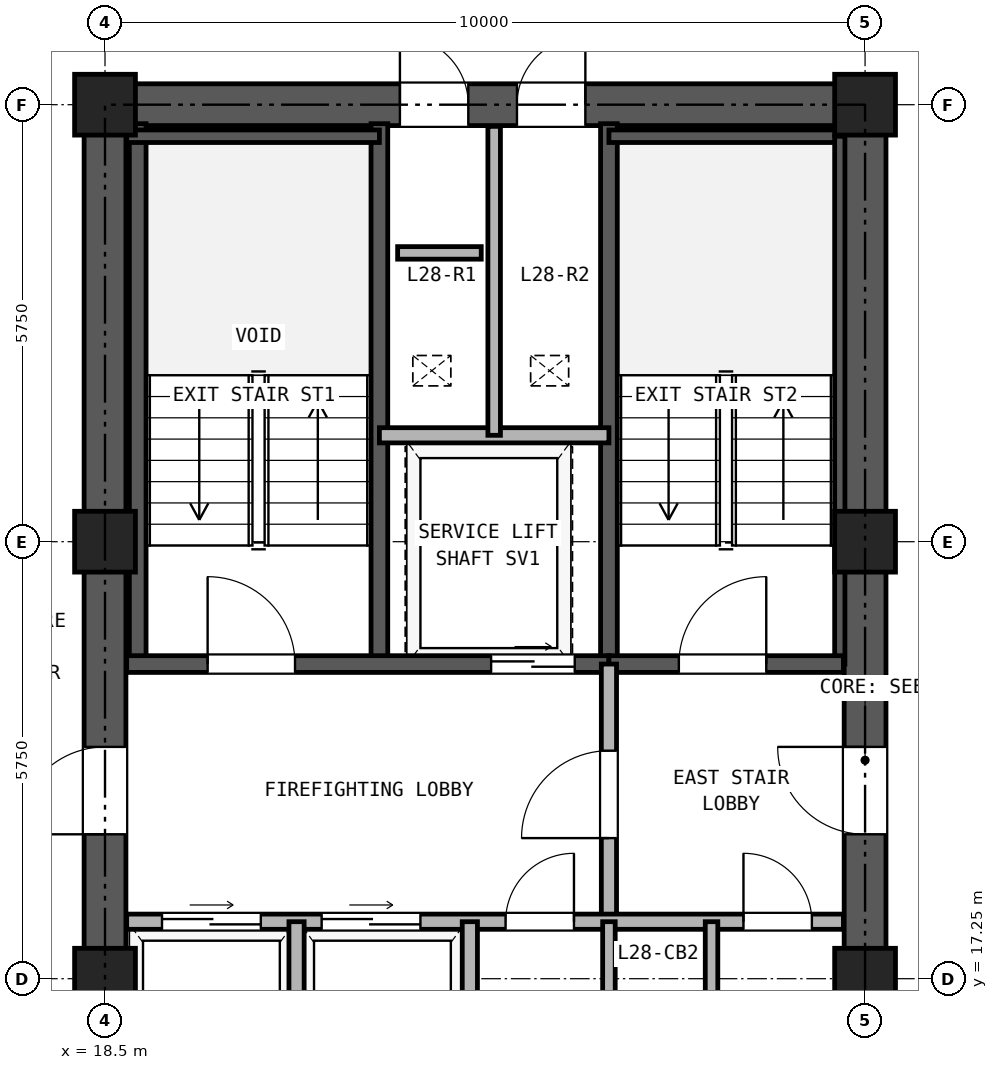
"""IFC4 building model, lengths in metres.
Left out: names, types, materials, properties, quantities, classifications, styles, units other than length and angle.
Written with IfcOpenShell. Run it as: python <this file> out.ifc"""

import sys

from ifc_helpers import new_model, si_unit, direction, frame, frame_2d, origin, origin_2d, place, context, subcontext, project, spatial, rectangle, hollow_rectangle, extrude, source, transform, mapped, element, fill, save


model = new_model("IFC4")
c1 = context("Model", 3, precision=1e-05, world=origin(), true_north=direction((0.0, 1.0)))
c2 = subcontext(c1, "Body", "Model", "MODEL_VIEW")
j1 = project(units=[si_unit("LENGTHUNIT", "METRE"), si_unit("PLANEANGLEUNIT", "RADIAN")], contexts=[c1])
p1 = place(None, origin())
s1 = spatial("IfcSite", under=j1, at=p1, CompositionType="ELEMENT")
p2 = place(p1, origin())
s2 = spatial("IfcBuilding", under=s1, at=p2, CompositionType="ELEMENT")
p3 = place(p2, frame((0.0, 0.0, 105.5)))
s3 = spatial("IfcBuildingStorey", under=s2, at=p3, CompositionType="ELEMENT", Elevation=105.5)
m1 = source(origin(), c2, "Body", "SweptSolid", [
    extrude(hollow_rectangle(XDim=0.8, YDim=0.8, WallThickness=0.045, at=origin_2d()), origin(), (0.0, 0.0, 1.0), 2.95),
])
for number, where, z_axis, x_axis in (
    (1, (18.5, 17.25, 0.0), (0.0, 0.0, 1.0), (1.0, 0.0, 0.0)),
    (2, (18.5, 23.0, 0.0), (0.0, 0.0, 1.0), (1.0, 0.0, 0.0)),
    (3, (18.5, 28.75, 0.0), (0.0, 0.0, 1.0), (1.0, 0.0, 0.0)),
    (4, (28.5, 17.25, 0.0), (0.0, 0.0, 1.0), (1.0, 0.0, 0.0)),
    (5, (28.5, 23.0, 0.0), (0.0, 0.0, 1.0), (1.0, 0.0, 0.0)),
    (6, (28.5, 28.75, 0.0), (0.0, 0.0, 1.0), (1.0, 0.0, 0.0)),
):
    element("IfcColumn", number, at=place(p3, frame(where, z_axis=z_axis, x_axis=x_axis)), inside=s3, PredefinedType="COLUMN", context=c2, shape_type="MappedRepresentation", body=[
        mapped(m1, transform((0.0, 0.0, 0.0), x_axis=(1.0, 0.0, 0.0), y_axis=(0.0, 1.0, 0.0), z_axis=(0.0, 0.0, 1.0), scale=1.0)),
    ])
p4 = place(p3, frame((18.225, 28.75, 0.0), z_axis=(0.0, 0.0, 1.0), x_axis=(1.0, 0.0, 0.0)))
e7 = element("IfcWall", 7, at=p4, inside=s3, PredefinedType="SHEAR", context=c2, shape_type="SweptSolid", body=[
    extrude(rectangle(XDim=10.55, YDim=0.55, at=frame_2d((5.275, 0.0))), origin(), (0.0, 0.0, 1.0), 2.95),
])
p5 = place(p4, frame((4.155, 0.0, 0.0)))
e8 = element("IfcOpeningElement", 8, at=p5, cuts=e7, PredefinedType="OPENING", context=c2, shape_type="SweptSolid", body=[
    extrude(rectangle(XDim=0.9, YDim=2.05, at=frame_2d((0.45, 1.025))), frame((0.0, 0.285, 0.0), z_axis=(0.0, -1.0, 0.0), x_axis=(1.0, 0.0, 0.0)), (0.0, 0.0, 1.0), 0.57),
])
p6 = place(p4, frame((5.695, 0.0, 0.0)))
e9 = element("IfcOpeningElement", 9, at=p6, cuts=e7, PredefinedType="OPENING", context=c2, shape_type="SweptSolid", body=[
    extrude(rectangle(XDim=0.9, YDim=2.05, at=frame_2d((0.45, 1.025))), frame((0.0, 0.285, 0.0), z_axis=(0.0, -1.0, 0.0), x_axis=(1.0, 0.0, 0.0)), (0.0, 0.0, 1.0), 0.57),
])
p7 = place(p3, frame((18.5, 11.775, 0.0), z_axis=(0.0, 0.0, 1.0), x_axis=(0.0, 1.0, 0.0)))
e10 = element("IfcWall", 10, at=p7, inside=s3, PredefinedType="SHEAR", context=c2, shape_type="SweptSolid", body=[
    extrude(rectangle(XDim=16.7, YDim=0.55, at=frame_2d((8.35, 0.0))), origin(), (0.0, 0.0, 1.0), 2.95),
])
p8 = place(p7, frame((7.375, 0.0, 0.0)))
e11 = element("IfcOpeningElement", 11, at=p8, cuts=e10, PredefinedType="OPENING", context=c2, shape_type="SweptSolid", body=[
    extrude(rectangle(XDim=1.15, YDim=2.2, at=frame_2d((0.575, 1.1))), frame((0.0, 0.285, 0.0), z_axis=(0.0, -1.0, 0.0), x_axis=(1.0, 0.0, 0.0)), (0.0, 0.0, 1.0), 0.57),
])
p9 = place(p3, frame((28.5, 11.775, 0.0), z_axis=(0.0, 0.0, 1.0), x_axis=(0.0, 1.0, 0.0)))
e12 = element("IfcWall", 12, at=p9, inside=s3, PredefinedType="SHEAR", context=c2, shape_type="SweptSolid", body=[
    extrude(rectangle(XDim=16.7, YDim=0.55, at=frame_2d((8.35, 0.0))), origin(), (0.0, 0.0, 1.0), 2.95),
])
p10 = place(p9, frame((7.375, 0.0, 0.0)))
e13 = element("IfcOpeningElement", 13, at=p10, cuts=e12, PredefinedType="OPENING", context=c2, shape_type="SweptSolid", body=[
    extrude(rectangle(XDim=1.15, YDim=2.2, at=frame_2d((0.575, 1.1))), frame((0.0, 0.285, 0.0), z_axis=(0.0, -1.0, 0.0), x_axis=(1.0, 0.0, 0.0)), (0.0, 0.0, 1.0), 0.57),
])
for number, where, z_axis, x_axis in (
    (14, (18.93, 21.39, 0.0), (0.0, 0.0, 1.0), (0.0, 1.0, 0.0)),
    (15, (22.11, 21.39, 0.0), (0.0, 0.0, 1.0), (0.0, 1.0, 0.0)),
    (16, (25.13, 21.39, 0.0), (0.0, 0.0, 1.0), (0.0, 1.0, 0.0)),
):
    element("IfcWall", number, at=place(p3, frame(where, z_axis=z_axis, x_axis=x_axis)), inside=s3, PredefinedType="SOLIDWALL", context=c2, shape_type="SweptSolid", body=[
        extrude(rectangle(XDim=7.11, YDim=0.22, at=frame_2d((3.555, 0.0))), origin(), (0.0, 0.0, 1.0), 2.95),
    ])
p11 = place(p3, frame((18.785, 28.335, 0.0), z_axis=(0.0, 0.0, 1.0), x_axis=(1.0, 0.0, 0.0)))
e17 = element("IfcWall", 17, at=p11, inside=s3, PredefinedType="PARTITIONING", context=c2, shape_type="SweptSolid", body=[
    extrude(rectangle(XDim=3.325, YDim=0.165, at=frame_2d((1.663, 0.0))), origin(), (0.0, 0.0, 1.0), 2.95),
])
p12 = place(p3, frame((25.13, 28.335, 0.0), z_axis=(0.0, 0.0, 1.0), x_axis=(1.0, 0.0, 0.0)))
e18 = element("IfcWall", 18, at=p12, inside=s3, PredefinedType="PARTITIONING", context=c2, shape_type="SweptSolid", body=[
    extrude(rectangle(XDim=3.085, YDim=0.165, at=frame_2d((1.542, 0.0))), origin(), (0.0, 0.0, 1.0), 2.95),
])
p13 = place(p3, frame((28.167, 21.39, 0.0), z_axis=(0.0, 0.0, 1.0), x_axis=(0.0, 1.0, 0.0)))
e19 = element("IfcWall", 19, at=p13, inside=s3, PredefinedType="PARTITIONING", context=c2, shape_type="SweptSolid", body=[
    extrude(rectangle(XDim=6.945, YDim=0.135, at=frame_2d((3.473, 0.0))), origin(), (0.0, 0.0, 1.0), 2.95),
])
p14 = place(p3, frame((18.785, 21.39, 0.0), z_axis=(0.0, 0.0, 1.0), x_axis=(1.0, 0.0, 0.0)))
e20 = element("IfcWall", 20, at=p14, inside=s3, PredefinedType="SOLIDWALL", context=c2, shape_type="SweptSolid", body=[
    extrude(rectangle(XDim=6.345, YDim=0.22, at=frame_2d((3.172, 0.0))), origin(), (0.0, 0.0, 1.0), 2.95),
])
p15 = place(p14, frame((1.065, 0.0, 0.0)))
e21 = element("IfcOpeningElement", 21, at=p15, cuts=e20, PredefinedType="OPENING", context=c2, shape_type="SweptSolid", body=[
    extrude(rectangle(XDim=1.15, YDim=2.2, at=frame_2d((0.575, 1.1))), frame((0.0, 0.12, 0.0), z_axis=(0.0, -1.0, 0.0), x_axis=(1.0, 0.0, 0.0)), (0.0, 0.0, 1.0), 0.24),
])
p16 = place(p14, frame((4.795, 0.0, 0.0)))
e22 = element("IfcOpeningElement", 22, at=p16, cuts=e20, PredefinedType="OPENING", context=c2, shape_type="SweptSolid", body=[
    extrude(rectangle(XDim=1.1, YDim=2.25, at=frame_2d((0.55, 1.125))), frame((0.0, 0.12, 0.0), z_axis=(0.0, -1.0, 0.0), x_axis=(1.0, 0.0, 0.0)), (0.0, 0.0, 1.0), 0.24),
])
p17 = place(p3, frame((25.13, 21.39, 0.0), z_axis=(0.0, 0.0, 1.0), x_axis=(1.0, 0.0, 0.0)))
e23 = element("IfcWall", 23, at=p17, inside=s3, PredefinedType="SOLIDWALL", context=c2, shape_type="SweptSolid", body=[
    extrude(rectangle(XDim=3.085, YDim=0.22, at=frame_2d((1.542, 0.0))), origin(), (0.0, 0.0, 1.0), 2.95),
])
p18 = place(p17, frame((0.92, 0.0, 0.0)))
e24 = element("IfcOpeningElement", 24, at=p18, cuts=e23, PredefinedType="OPENING", context=c2, shape_type="SweptSolid", body=[
    extrude(rectangle(XDim=1.15, YDim=2.2, at=frame_2d((0.575, 1.1))), frame((0.0, 0.12, 0.0), z_axis=(0.0, -1.0, 0.0), x_axis=(1.0, 0.0, 0.0)), (0.0, 0.0, 1.0), 0.24),
])
p19 = place(p3, frame((22.11, 24.4, 0.0), z_axis=(0.0, 0.0, 1.0), x_axis=(1.0, 0.0, 0.0)))
e25 = element("IfcWall", 25, at=p19, inside=s3, PredefinedType="PARTITIONING", context=c2, shape_type="SweptSolid", body=[
    extrude(rectangle(XDim=3.02, YDim=0.2, at=frame_2d((1.51, 0.0))), origin(), (0.0, 0.0, 1.0), 2.95),
])
p20 = place(p3, frame((23.62, 24.4, 0.0), z_axis=(0.0, 0.0, 1.0), x_axis=(0.0, 1.0, 0.0)))
e26 = element("IfcWall", 26, at=p20, inside=s3, PredefinedType="PARTITIONING", context=c2, shape_type="SweptSolid", body=[
    extrude(rectangle(XDim=4.065, YDim=0.165, at=frame_2d((2.033, 0.0))), origin(), (0.0, 0.0, 1.0), 2.95),
])
p21 = place(p3, frame((25.13, 18.0, 0.0), z_axis=(0.0, 0.0, 1.0), x_axis=(0.0, 1.0, 0.0)))
e27 = element("IfcWall", 27, at=p21, inside=s3, PredefinedType="PARTITIONING", context=c2, shape_type="SweptSolid", body=[
    extrude(rectangle(XDim=3.39, YDim=0.2, at=frame_2d((1.695, 0.0))), origin(), (0.0, 0.0, 1.0), 2.95),
])
p22 = place(p21, frame((1.1, 0.0, 0.0)))
e28 = element("IfcOpeningElement", 28, at=p22, cuts=e27, PredefinedType="OPENING", context=c2, shape_type="SweptSolid", body=[
    extrude(rectangle(XDim=1.15, YDim=2.2, at=frame_2d((0.575, 1.1))), frame((0.0, 0.11, 0.0), z_axis=(0.0, -1.0, 0.0), x_axis=(1.0, 0.0, 0.0)), (0.0, 0.0, 1.0), 0.22),
])
p23 = place(p3, frame((18.785, 18.0, 0.0), z_axis=(0.0, 0.0, 1.0), x_axis=(1.0, 0.0, 0.0)))
e29 = element("IfcWall", 29, at=p23, inside=s3, PredefinedType="PARTITIONING", context=c2, shape_type="SweptSolid", body=[
    extrude(rectangle(XDim=9.43, YDim=0.2, at=frame_2d((4.715, 0.0))), origin(), (0.0, 0.0, 1.0), 2.95),
])
p24 = place(p23, frame((0.465, 0.0, 0.0)))
e30 = element("IfcOpeningElement", 30, at=p24, cuts=e29, PredefinedType="OPENING", context=c2, shape_type="SweptSolid", body=[
    extrude(rectangle(XDim=1.3, YDim=2.3, at=frame_2d((0.65, 1.15))), frame((0.0, 0.11, 0.0), z_axis=(0.0, -1.0, 0.0), x_axis=(1.0, 0.0, 0.0)), (0.0, 0.0, 1.0), 0.22),
])
p25 = place(p23, frame((2.565, 0.0, 0.0)))
e31 = element("IfcOpeningElement", 31, at=p25, cuts=e29, PredefinedType="OPENING", context=c2, shape_type="SweptSolid", body=[
    extrude(rectangle(XDim=1.3, YDim=2.3, at=frame_2d((0.65, 1.15))), frame((0.0, 0.11, 0.0), z_axis=(0.0, -1.0, 0.0), x_axis=(1.0, 0.0, 0.0)), (0.0, 0.0, 1.0), 0.22),
])
p26 = place(p23, frame((4.985, 0.0, 0.0)))
e32 = element("IfcOpeningElement", 32, at=p26, cuts=e29, PredefinedType="OPENING", context=c2, shape_type="SweptSolid", body=[
    extrude(rectangle(XDim=0.9, YDim=2.05, at=frame_2d((0.45, 1.025))), frame((0.0, 0.11, 0.0), z_axis=(0.0, -1.0, 0.0), x_axis=(1.0, 0.0, 0.0)), (0.0, 0.0, 1.0), 0.22),
])
p27 = place(p23, frame((8.115, 0.0, 0.0)))
e33 = element("IfcOpeningElement", 33, at=p27, cuts=e29, PredefinedType="OPENING", context=c2, shape_type="SweptSolid", body=[
    extrude(rectangle(XDim=0.9, YDim=2.05, at=frame_2d((0.45, 1.025))), frame((0.0, 0.11, 0.0), z_axis=(0.0, -1.0, 0.0), x_axis=(1.0, 0.0, 0.0)), (0.0, 0.0, 1.0), 0.22),
])
for number, where, z_axis, x_axis in (
    (34, (21.02, 15.0, 0.0), (0.0, 0.0, 1.0), (0.0, 1.0, 0.0)),
    (35, (23.3, 15.0, 0.0), (0.0, 0.0, 1.0), (0.0, 1.0, 0.0)),
):
    element("IfcWall", number, at=place(p3, frame(where, z_axis=z_axis, x_axis=x_axis)), inside=s3, PredefinedType="PARTITIONING", context=c2, shape_type="SweptSolid", body=[
        extrude(rectangle(XDim=3.0, YDim=0.2, at=frame_2d((1.5, 0.0))), origin(), (0.0, 0.0, 1.0), 2.95),
    ])
p28 = place(p3, frame((25.13, 15.0, 0.0), z_axis=(0.0, 0.0, 1.0), x_axis=(0.0, 1.0, 0.0)))
e36 = element("IfcWall", 36, at=p28, inside=s3, PredefinedType="PARTITIONING", context=c2, shape_type="SweptSolid", body=[
    extrude(rectangle(XDim=3.0, YDim=0.165, at=frame_2d((1.5, 0.0))), origin(), (0.0, 0.0, 1.0), 2.95),
])
p29 = place(p3, frame((26.48, 15.0, 0.0), z_axis=(0.0, 0.0, 1.0), x_axis=(0.0, 1.0, 0.0)))
e37 = element("IfcWall", 37, at=p29, inside=s3, PredefinedType="PARTITIONING", context=c2, shape_type="SweptSolid", body=[
    extrude(rectangle(XDim=3.0, YDim=0.165, at=frame_2d((1.5, 0.0))), origin(), (0.0, 0.0, 1.0), 2.95),
])
p30 = place(p29, frame((1.05, 0.0, 0.0)))
e38 = element("IfcOpeningElement", 38, at=p30, cuts=e37, PredefinedType="OPENING", context=c2, shape_type="SweptSolid", body=[
    extrude(rectangle(XDim=0.9, YDim=2.05, at=frame_2d((0.45, 1.025))), frame((0.0, 0.093, 0.0), z_axis=(0.0, -1.0, 0.0), x_axis=(1.0, 0.0, 0.0)), (0.0, 0.0, 1.0), 0.185),
])
p31 = place(p3, frame((22.35, 26.8, 0.0), z_axis=(0.0, 0.0, 1.0), x_axis=(1.0, 0.0, 0.0)))
e39 = element("IfcWall", 39, at=p31, inside=s3, PredefinedType="PARTITIONING", context=c2, shape_type="SweptSolid", body=[
    extrude(rectangle(XDim=1.1, YDim=0.165, at=frame_2d((0.55, 0.0))), origin(), (0.0, 0.0, 1.0), 2.95),
])
p32 = place(p15, frame((1.15, 0.0, 0.0), z_axis=(0.0, 0.0, 1.0), x_axis=(-1.0, 0.0, 0.0)))
e40 = element("IfcDoor", 40, at=p32, inside=s3, OperationType="SINGLE_SWING_LEFT", PredefinedType="DOOR", context=c2, shape_type="SweptSolid", body=[
    extrude(rectangle(XDim=1.15, YDim=2.2, at=frame_2d((0.575, 1.1))), frame((0.0, 0.025, 0.0), z_axis=(0.0, -1.0, 0.0), x_axis=(1.0, 0.0, 0.0)), (0.0, 0.0, 1.0), 0.05),
])
fill(e21, e40)
p33 = place(p18, frame((1.15, 0.0, 0.0), z_axis=(0.0, 0.0, 1.0), x_axis=(-1.0, 0.0, 0.0)))
e41 = element("IfcDoor", 41, at=p33, inside=s3, OperationType="SINGLE_SWING_RIGHT", PredefinedType="DOOR", context=c2, shape_type="SweptSolid", body=[
    extrude(rectangle(XDim=1.15, YDim=2.2, at=frame_2d((0.575, 1.1))), frame((0.0, 0.025, 0.0), z_axis=(0.0, -1.0, 0.0), x_axis=(1.0, 0.0, 0.0)), (0.0, 0.0, 1.0), 0.05),
])
fill(e24, e41)
p34 = place(p16, frame((1.1, 0.0, 0.0), z_axis=(0.0, 0.0, 1.0), x_axis=(-1.0, 0.0, 0.0)))
e42 = element("IfcDoor", 42, at=p34, inside=s3, OperationType="DOUBLE_DOOR_SLIDING", PredefinedType="DOOR", context=c2, shape_type="SweptSolid", body=[
    extrude(rectangle(XDim=1.1, YDim=2.25, at=frame_2d((0.55, 1.125))), frame((0.0, 0.025, 0.0), z_axis=(0.0, -1.0, 0.0), x_axis=(1.0, 0.0, 0.0)), (0.0, 0.0, 1.0), 0.05),
])
fill(e22, e42)
p35 = place(p22, origin())
e43 = element("IfcDoor", 43, at=p35, inside=s3, OperationType="SINGLE_SWING_LEFT", PredefinedType="DOOR", context=c2, shape_type="SweptSolid", body=[
    extrude(rectangle(XDim=1.15, YDim=2.2, at=frame_2d((0.575, 1.1))), frame((0.0, 0.025, 0.0), z_axis=(0.0, -1.0, 0.0), x_axis=(1.0, 0.0, 0.0)), (0.0, 0.0, 1.0), 0.05),
])
fill(e28, e43)
p36 = place(p24, origin())
e44 = element("IfcDoor", 44, at=p36, inside=s3, OperationType="DOUBLE_DOOR_SLIDING", PredefinedType="DOOR", context=c2, shape_type="SweptSolid", body=[
    extrude(rectangle(XDim=1.3, YDim=2.3, at=frame_2d((0.65, 1.15))), frame((0.0, 0.025, 0.0), z_axis=(0.0, -1.0, 0.0), x_axis=(1.0, 0.0, 0.0)), (0.0, 0.0, 1.0), 0.05),
])
fill(e30, e44)
p37 = place(p25, origin())
e45 = element("IfcDoor", 45, at=p37, inside=s3, OperationType="DOUBLE_DOOR_SLIDING", PredefinedType="DOOR", context=c2, shape_type="SweptSolid", body=[
    extrude(rectangle(XDim=1.3, YDim=2.3, at=frame_2d((0.65, 1.15))), frame((0.0, 0.025, 0.0), z_axis=(0.0, -1.0, 0.0), x_axis=(1.0, 0.0, 0.0)), (0.0, 0.0, 1.0), 0.05),
])
fill(e31, e45)
p38 = place(p26, frame((0.9, 0.0, 0.0), z_axis=(0.0, 0.0, 1.0), x_axis=(-1.0, 0.0, 0.0)))
e46 = element("IfcDoor", 46, at=p38, inside=s3, OperationType="SINGLE_SWING_RIGHT", PredefinedType="DOOR", context=c2, shape_type="SweptSolid", body=[
    extrude(rectangle(XDim=0.9, YDim=2.05, at=frame_2d((0.45, 1.025))), frame((0.0, 0.025, 0.0), z_axis=(0.0, -1.0, 0.0), x_axis=(1.0, 0.0, 0.0)), (0.0, 0.0, 1.0), 0.05),
])
fill(e32, e46)
p39 = place(p27, frame((0.9, 0.0, 0.0), z_axis=(0.0, 0.0, 1.0), x_axis=(-1.0, 0.0, 0.0)))
e47 = element("IfcDoor", 47, at=p39, inside=s3, OperationType="SINGLE_SWING_LEFT", PredefinedType="DOOR", context=c2, shape_type="SweptSolid", body=[
    extrude(rectangle(XDim=0.9, YDim=2.05, at=frame_2d((0.45, 1.025))), frame((0.0, 0.025, 0.0), z_axis=(0.0, -1.0, 0.0), x_axis=(1.0, 0.0, 0.0)), (0.0, 0.0, 1.0), 0.05),
])
fill(e33, e47)
p40 = place(p8, frame((1.15, 0.0, 0.0), z_axis=(0.0, 0.0, 1.0), x_axis=(-1.0, 0.0, 0.0)))
e48 = element("IfcDoor", 48, at=p40, inside=s3, OperationType="SINGLE_SWING_LEFT", PredefinedType="DOOR", context=c2, shape_type="SweptSolid", body=[
    extrude(rectangle(XDim=1.15, YDim=2.2, at=frame_2d((0.575, 1.1))), frame((0.0, 0.025, 0.0), z_axis=(0.0, -1.0, 0.0), x_axis=(1.0, 0.0, 0.0)), (0.0, 0.0, 1.0), 0.05),
])
fill(e11, e48)
p41 = place(p10, origin())
e49 = element("IfcDoor", 49, at=p41, inside=s3, OperationType="SINGLE_SWING_RIGHT", PredefinedType="DOOR", context=c2, shape_type="SweptSolid", body=[
    extrude(rectangle(XDim=1.15, YDim=2.2, at=frame_2d((0.575, 1.1))), frame((0.0, 0.025, 0.0), z_axis=(0.0, -1.0, 0.0), x_axis=(1.0, 0.0, 0.0)), (0.0, 0.0, 1.0), 0.05),
])
fill(e13, e49)
p42 = place(p5, origin())
e50 = element("IfcDoor", 50, at=p42, inside=s3, OperationType="SINGLE_SWING_LEFT", PredefinedType="DOOR", context=c2, shape_type="SweptSolid", body=[
    extrude(rectangle(XDim=0.9, YDim=2.05, at=frame_2d((0.45, 1.025))), frame((0.0, 0.025, 0.0), z_axis=(0.0, -1.0, 0.0), x_axis=(1.0, 0.0, 0.0)), (0.0, 0.0, 1.0), 0.05),
])
fill(e8, e50)
p43 = place(p6, origin())
e51 = element("IfcDoor", 51, at=p43, inside=s3, OperationType="SINGLE_SWING_RIGHT", PredefinedType="DOOR", context=c2, shape_type="SweptSolid", body=[
    extrude(rectangle(XDim=0.9, YDim=2.05, at=frame_2d((0.45, 1.025))), frame((0.0, 0.025, 0.0), z_axis=(0.0, -1.0, 0.0), x_axis=(1.0, 0.0, 0.0)), (0.0, 0.0, 1.0), 0.05),
])
fill(e9, e51)
save(model, sys.argv[1])
